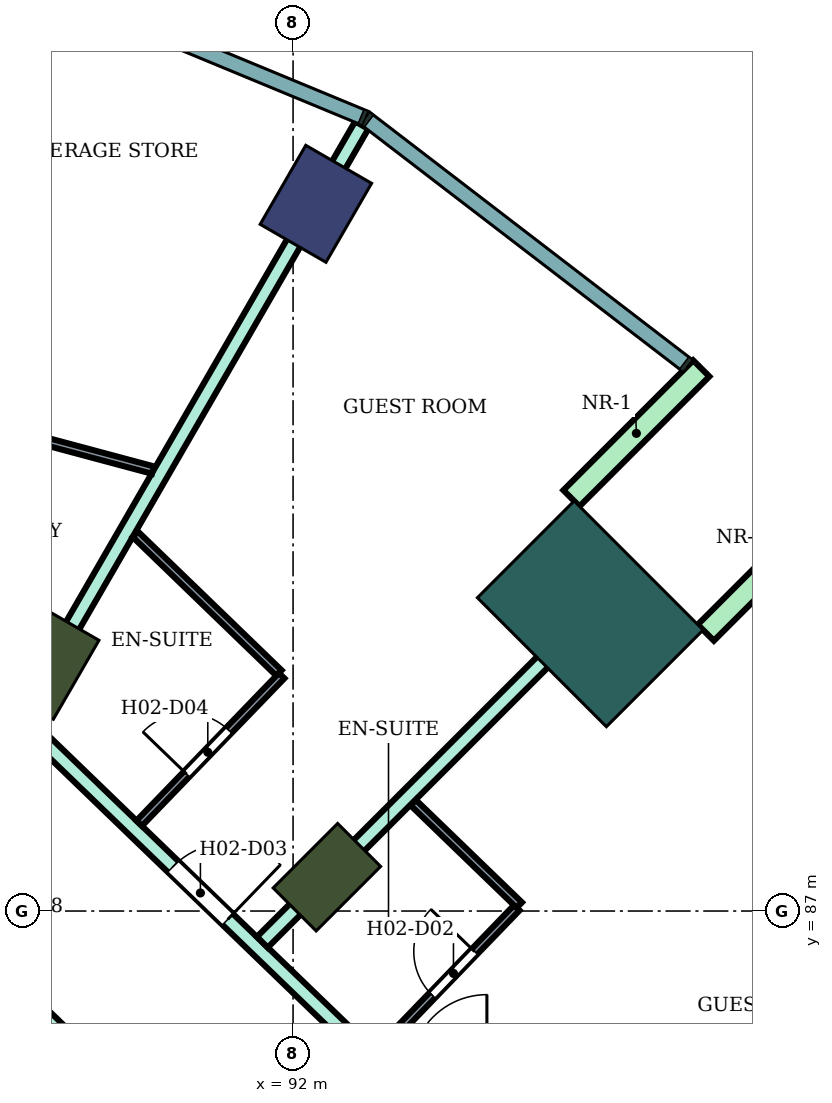
"""IFC4 building model, lengths in metres.
Left out: names, types, materials, properties, quantities, classifications, styles, units other than length and angle.
Written with IfcOpenShell. Run it as: python <this file> out.ifc"""

import sys

from ifc_helpers import new_model, si_unit, direction, frame, frame_2d, origin, origin_2d, place, context, subcontext, project, spatial, rectangle, extrude, element, fill, save


model = new_model("IFC4")
c1 = context("Model", 3, precision=1e-05, world=origin(), true_north=direction((0.0, 1.0)))
c2 = subcontext(c1, "Body", "Model", "MODEL_VIEW")
j1 = project(units=[si_unit("LENGTHUNIT", "METRE"), si_unit("PLANEANGLEUNIT", "RADIAN")], contexts=[c1])
p1 = place(None, origin())
s1 = spatial("IfcSite", under=j1, at=p1, CompositionType="ELEMENT")
p2 = place(p1, origin())
s2 = spatial("IfcBuilding", under=s1, at=p2, CompositionType="ELEMENT")
p3 = place(p2, frame((0.0, 0.0, 44.0)))
s3 = spatial("IfcBuildingStorey", under=s2, at=p3, CompositionType="ELEMENT", Elevation=44.0)
p4 = place(p3, frame((92.3, 96.304, 0.0), z_axis=(0.0, 0.0, 1.0), x_axis=(0.5, 0.866025403784, 0.0)))
e1 = element("IfcColumn", 1, at=p4, inside=s3, PredefinedType="COLUMN", context=c2, shape_type="SweptSolid", body=[
    extrude(rectangle(XDim=1.2, YDim=1.0, at=origin_2d()), origin(), (0.0, 0.0, 1.0), 3.8),
])
for number, where, z_axis, x_axis in (
    (2, (92.445, 87.445, 0.0), (0.0, 0.0, 1.0), (0.707, 0.707, 0.0)),
    (3, (88.8, 90.242, 0.0), (0.0, 0.0, 1.0), (0.5, 0.866, 0.0)),
):
    element("IfcColumn", number, at=place(p3, frame(where, z_axis=z_axis, x_axis=x_axis)), inside=s3, PredefinedType="COLUMN", context=c2, shape_type="SweptSolid", body=[
        extrude(rectangle(XDim=1.2, YDim=0.8, at=origin_2d()), origin(), (0.0, 0.0, 1.0), 3.8),
    ])
p5 = place(p3, frame((95.91, 90.91, 0.0), z_axis=(0.0, 0.0, 1.0), x_axis=(0.707106781187, 0.707106781187, 0.0)))
e4 = element("IfcColumn", 4, at=p5, inside=s3, PredefinedType="COLUMN", context=c2, shape_type="SweptSolid", body=[
    extrude(rectangle(XDim=1.8, YDim=2.4, at=origin_2d()), origin(), (0.0, 0.0, 1.0), 3.8),
])
for number, where, z_axis, x_axis in (
    (5, (97.43, 90.662, 0.0), (0.0, 0.0, 1.0), (0.707, 0.707, 0.0)),
    (6, (95.662, 92.43, 0.0), (0.0, 0.0, 1.0), (0.707, 0.707, 0.0)),
):
    element("IfcWall", number, at=place(p3, frame(where, z_axis=z_axis, x_axis=x_axis)), inside=s3, PredefinedType="NOTDEFINED", context=c2, shape_type="SweptSolid", body=[
        extrude(rectangle(XDim=2.416, YDim=0.3, at=frame_2d((1.208, 0.0))), origin(), (0.0, 0.0, 1.0), 3.8),
    ])
p6 = place(p3, frame((87.064, 87.211, 0.0), z_axis=(0.0, 0.0, 1.0), x_axis=(0.719540958932, -0.694450004262, 0.0)))
e7 = element("IfcWall", 7, at=p6, inside=s3, PredefinedType="PARTITIONING", context=c2, shape_type="SweptSolid", body=[
    extrude(rectangle(XDim=5.488, YDim=0.2, at=frame_2d((2.744, 0.0))), origin(), (0.0, 0.0, 1.0), 3.35),
])
p7 = place(p6, frame((0.55, 0.0, 0.0)))
e8 = element("IfcOpeningElement", 8, at=p7, cuts=e7, PredefinedType="OPENING", context=c2, shape_type="SweptSolid", body=[
    extrude(rectangle(XDim=1.0, YDim=2.1, at=frame_2d((0.5, 1.05))), frame((0.0, 0.11, 0.0), z_axis=(0.0, -1.0, 0.0), x_axis=(1.0, 0.0, 0.0)), (0.0, 0.0, 1.0), 0.22),
])
p8 = place(p3, frame((88.465, 89.473, 0.0), z_axis=(0.0, 0.0, 1.0), x_axis=(0.719474304909, -0.694519059908, 0.0)))
e9 = element("IfcWall", 9, at=p8, inside=s3, PredefinedType="PARTITIONING", context=c2, shape_type="SweptSolid", body=[
    extrude(rectangle(XDim=6.525, YDim=0.2, at=frame_2d((3.263, 0.0))), origin(), (0.0, 0.0, 1.0), 3.35),
])
p9 = place(p8, frame((2.719, 0.0, 0.0)))
e10 = element("IfcOpeningElement", 10, at=p9, cuts=e9, PredefinedType="OPENING", context=c2, shape_type="SweptSolid", body=[
    extrude(rectangle(XDim=1.0, YDim=2.1, at=frame_2d((0.5, 1.05))), frame((0.0, 0.11, 0.0), z_axis=(0.0, -1.0, 0.0), x_axis=(1.0, 0.0, 0.0)), (0.0, 0.0, 1.0), 0.22),
])
p10 = place(p3, frame((88.397, 89.539, 0.0), z_axis=(0.0, 0.0, 1.0), x_axis=(0.500228379329, 0.86589350876, 0.0)))
e11 = element("IfcWall", 11, at=p10, inside=s3, PredefinedType="PARTITIONING", context=c2, shape_type="SweptSolid", body=[
    extrude(rectangle(XDim=9.008, YDim=0.2, at=frame_2d((4.504, 0.0))), origin(), (0.0, 0.0, 1.0), 3.35),
])
p11 = place(p3, frame((91.595, 86.59, 0.0), z_axis=(0.0, 0.0, 1.0), x_axis=(0.707232337591, 0.706981202484, 0.0)))
e12 = element("IfcWall", 12, at=p11, inside=s3, PredefinedType="PARTITIONING", context=c2, shape_type="SweptSolid", body=[
    extrude(rectangle(XDim=6.805, YDim=0.2, at=frame_2d((3.402, 0.0))), origin(), (0.0, 0.0, 1.0), 3.35),
])
p12 = place(p3, frame((85.237, 94.119, 0.0), z_axis=(0.0, 0.0, 1.0), x_axis=(0.965923866142, -0.258826360359, 0.0)))
e13 = element("IfcWall", 13, at=p12, inside=s3, PredefinedType="PARTITIONING", context=c2, shape_type="SweptSolid", body=[
    extrude(rectangle(XDim=5.092, YDim=0.1, at=frame_2d((2.546, 0.0))), origin(), (0.0, 0.0, 1.0), 3.35),
])
p13 = place(p12, frame((2.096, 0.0, 0.0)))
e14 = element("IfcOpeningElement", 14, at=p13, cuts=e13, PredefinedType="OPENING", context=c2, shape_type="SweptSolid", body=[
    extrude(rectangle(XDim=0.9, YDim=2.1, at=frame_2d((0.45, 1.05))), frame((0.0, 0.06, 0.0), z_axis=(0.0, -1.0, 0.0), x_axis=(1.0, 0.0, 0.0)), (0.0, 0.0, 1.0), 0.12),
])
p14 = place(p3, frame((89.925, 91.956, 0.0), z_axis=(0.0, 0.0, 1.0), x_axis=(0.71931338148, -0.694685726947, 0.0)))
e15 = element("IfcWall", 15, at=p14, inside=s3, PredefinedType="PARTITIONING", context=c2, shape_type="SweptSolid", body=[
    extrude(rectangle(XDim=2.627, YDim=0.1, at=frame_2d((1.313, 0.0))), origin(), (0.0, 0.0, 1.0), 3.35),
])
p15 = place(p3, frame((89.976, 88.154, 0.0), z_axis=(0.0, 0.0, 1.0), x_axis=(0.6945137956, 0.719479386585, 0.0)))
e16 = element("IfcWall", 16, at=p15, inside=s3, PredefinedType="PARTITIONING", context=c2, shape_type="SweptSolid", body=[
    extrude(rectangle(XDim=2.699, YDim=0.1, at=frame_2d((1.35, 0.0))), origin(), (0.0, 0.0, 1.0), 3.35),
])
p16 = place(p15, frame((0.9, 0.0, 0.0)))
e17 = element("IfcOpeningElement", 17, at=p16, cuts=e16, PredefinedType="OPENING", context=c2, shape_type="SweptSolid", body=[
    extrude(rectangle(XDim=0.8, YDim=2.1, at=frame_2d((0.4, 1.05))), frame((0.0, 0.06, 0.0), z_axis=(0.0, -1.0, 0.0), x_axis=(1.0, 0.0, 0.0)), (0.0, 0.0, 1.0), 0.12),
])
p17 = place(p3, frame((93.104, 85.136, 0.0), z_axis=(0.0, 0.0, 1.0), x_axis=(0.694324808789, 0.719661767708, 0.0)))
e18 = element("IfcWall", 18, at=p17, inside=s3, PredefinedType="PARTITIONING", context=c2, shape_type="SweptSolid", body=[
    extrude(rectangle(XDim=2.65, YDim=0.1, at=frame_2d((1.325, 0.0))), origin(), (0.0, 0.0, 1.0), 3.35),
])
p18 = place(p17, frame((1.05, 0.0, 0.0)))
e19 = element("IfcOpeningElement", 19, at=p18, cuts=e18, PredefinedType="OPENING", context=c2, shape_type="SweptSolid", body=[
    extrude(rectangle(XDim=0.8, YDim=2.1, at=frame_2d((0.4, 1.05))), frame((0.0, 0.06, 0.0), z_axis=(0.0, -1.0, 0.0), x_axis=(1.0, 0.0, 0.0)), (0.0, 0.0, 1.0), 0.12),
])
p19 = place(p3, frame((93.582, 88.425, 0.0), z_axis=(0.0, 0.0, 1.0), x_axis=(0.719334224501, -0.694664144361, 0.0)))
e20 = element("IfcWall", 20, at=p19, inside=s3, PredefinedType="PARTITIONING", context=c2, shape_type="SweptSolid", body=[
    extrude(rectangle(XDim=1.94, YDim=0.1, at=frame_2d((0.97, 0.0))), origin(), (0.0, 0.0, 1.0), 3.35),
])
p20 = place(p18, origin())
e21 = element("IfcDoor", 21, at=p20, inside=s3, OperationType="SINGLE_SWING_RIGHT", PredefinedType="DOOR", context=c2, shape_type="SweptSolid", body=[
    extrude(rectangle(XDim=0.8, YDim=2.1, at=frame_2d((0.4, 1.05))), frame((0.0, 0.025, 0.0), z_axis=(0.0, -1.0, 0.0), x_axis=(1.0, 0.0, 0.0)), (0.0, 0.0, 1.0), 0.05),
])
fill(e19, e21)
p21 = place(p9, origin())
e22 = element("IfcDoor", 22, at=p21, inside=s3, OperationType="SINGLE_SWING_RIGHT", PredefinedType="DOOR", context=c2, shape_type="SweptSolid", body=[
    extrude(rectangle(XDim=1.0, YDim=2.1, at=frame_2d((0.5, 1.05))), frame((0.0, 0.025, 0.0), z_axis=(0.0, -1.0, 0.0), x_axis=(1.0, 0.0, 0.0)), (0.0, 0.0, 1.0), 0.05),
])
fill(e10, e22)
p22 = place(p16, origin())
e23 = element("IfcDoor", 23, at=p22, inside=s3, OperationType="SINGLE_SWING_LEFT", PredefinedType="DOOR", context=c2, shape_type="SweptSolid", body=[
    extrude(rectangle(XDim=0.8, YDim=2.1, at=frame_2d((0.4, 1.05))), frame((0.0, 0.025, 0.0), z_axis=(0.0, -1.0, 0.0), x_axis=(1.0, 0.0, 0.0)), (0.0, 0.0, 1.0), 0.05),
])
fill(e17, e23)
save(model, sys.argv[1])
